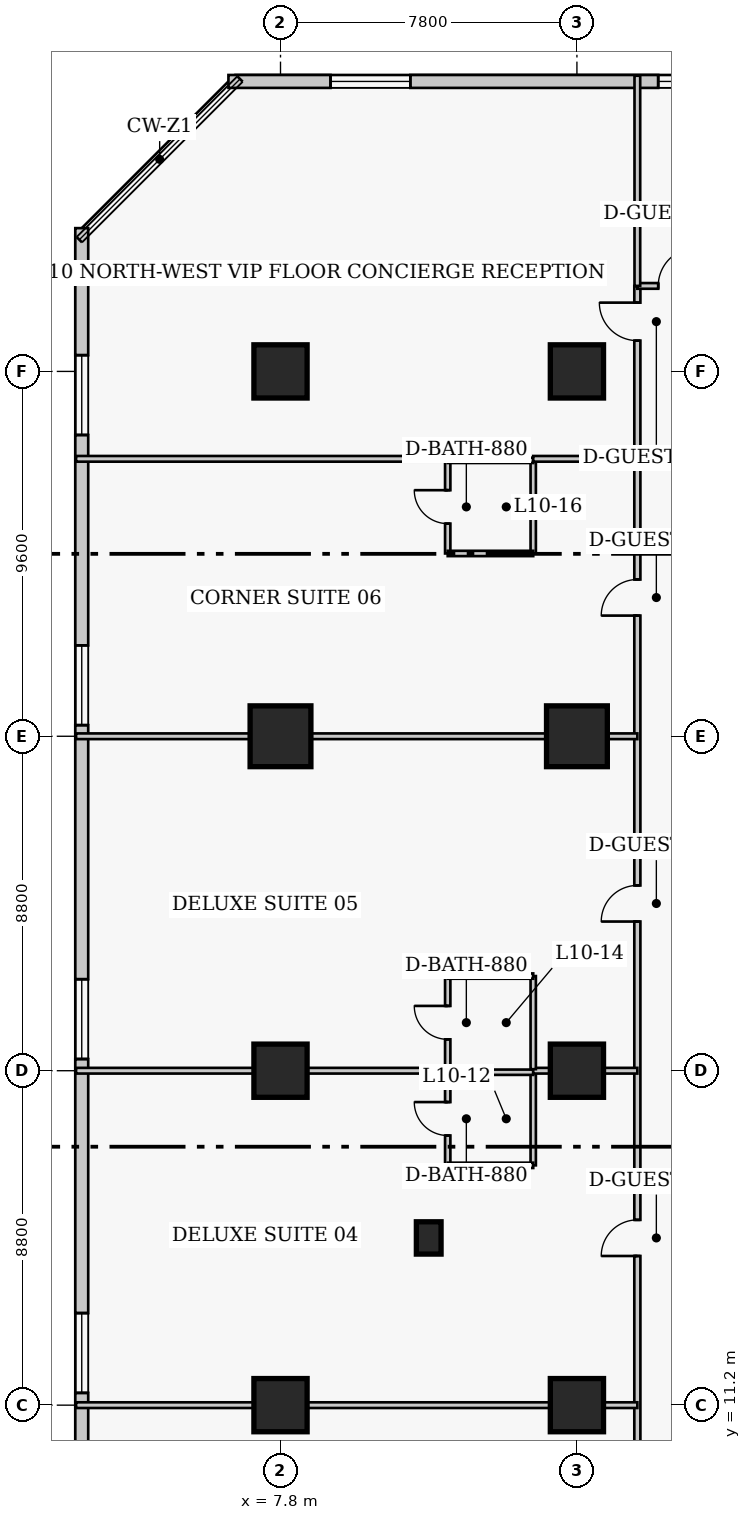
"""IFC4 building model, lengths in metres.
Left out: names, types, materials, properties, quantities, classifications, styles, units other than length and angle.
Written with IfcOpenShell. Run it as: python <this file> out.ifc"""

import sys

from ifc_helpers import new_model, si_unit, direction, frame, frame_2d, origin, origin_2d, place, context, subcontext, project, spatial, rectangle, extrude, element, fill, save


model = new_model("IFC4")
c1 = context("Model", 3, precision=1e-05, world=origin(), true_north=direction((0.0, 1.0)))
c2 = subcontext(c1, "Body", "Model", "MODEL_VIEW")
j1 = project(units=[si_unit("LENGTHUNIT", "METRE"), si_unit("PLANEANGLEUNIT", "RADIAN")], contexts=[c1])
p1 = place(None, origin())
s1 = spatial("IfcSite", under=j1, at=p1, CompositionType="ELEMENT")
p2 = place(p1, origin())
s2 = spatial("IfcBuilding", under=s1, at=p2, CompositionType="ELEMENT")
p3 = place(p2, frame((0.0, 0.0, 45.0)))
s3 = spatial("IfcBuildingStorey", under=s2, at=p3, CompositionType="ELEMENT", Elevation=45.0)
for number, where, z_axis, x_axis in (
    (1, (7.8, 11.2, 0.0), (0.0, 0.0, 1.0), (1.0, 0.0, 0.0)),
    (2, (7.8, 20.0, 0.0), (0.0, 0.0, 1.0), (1.0, 0.0, 0.0)),
):
    element("IfcColumn", number, at=place(p3, frame(where, z_axis=z_axis, x_axis=x_axis)), inside=s3, PredefinedType="COLUMN", context=c2, shape_type="SweptSolid", body=[
        extrude(rectangle(XDim=1.4, YDim=1.4, at=origin_2d()), origin(), (0.0, 0.0, 1.0), 3.8),
    ])
p4 = place(p3, frame((7.8, 28.8, 0.0), z_axis=(0.0, 0.0, 1.0), x_axis=(1.0, 0.0, 0.0)))
e3 = element("IfcColumn", 3, at=p4, inside=s3, PredefinedType="COLUMN", context=c2, shape_type="SweptSolid", body=[
    extrude(rectangle(XDim=1.6, YDim=1.6, at=origin_2d()), origin(), (0.0, 0.0, 1.0), 3.8),
])
for number, where, z_axis, x_axis in (
    (4, (7.8, 38.4, 0.0), (0.0, 0.0, 1.0), (1.0, 0.0, 0.0)),
    (5, (15.6, 11.2, 0.0), (0.0, 0.0, 1.0), (1.0, 0.0, 0.0)),
    (6, (15.6, 20.0, 0.0), (0.0, 0.0, 1.0), (1.0, 0.0, 0.0)),
):
    element("IfcColumn", number, at=place(p3, frame(where, z_axis=z_axis, x_axis=x_axis)), inside=s3, PredefinedType="COLUMN", context=c2, shape_type="SweptSolid", body=[
        extrude(rectangle(XDim=1.4, YDim=1.4, at=origin_2d()), origin(), (0.0, 0.0, 1.0), 3.8),
    ])
p5 = place(p3, frame((15.6, 28.8, 0.0), z_axis=(0.0, 0.0, 1.0), x_axis=(1.0, 0.0, 0.0)))
e7 = element("IfcColumn", 7, at=p5, inside=s3, PredefinedType="COLUMN", context=c2, shape_type="SweptSolid", body=[
    extrude(rectangle(XDim=1.6, YDim=1.6, at=origin_2d()), origin(), (0.0, 0.0, 1.0), 3.8),
])
p6 = place(p3, frame((15.6, 38.4, 0.0), z_axis=(0.0, 0.0, 1.0), x_axis=(1.0, 0.0, 0.0)))
e8 = element("IfcColumn", 8, at=p6, inside=s3, PredefinedType="COLUMN", context=c2, shape_type="SweptSolid", body=[
    extrude(rectangle(XDim=1.4, YDim=1.4, at=origin_2d()), origin(), (0.0, 0.0, 1.0), 3.8),
])
p7 = place(p3, frame((11.7, 15.6, 0.0), z_axis=(0.0, 0.0, 1.0), x_axis=(1.0, 0.0, 0.0)))
e9 = element("IfcColumn", 9, at=p7, inside=s3, PredefinedType="PILASTER", context=c2, shape_type="SweptSolid", body=[
    extrude(rectangle(XDim=0.65, YDim=0.85, at=origin_2d()), origin(), (0.0, 0.0, 1.0), 3.8),
])
p8 = place(p3, frame((36.32, 46.03, 0.0), z_axis=(0.0, 0.0, 1.0), x_axis=(-1.0, 0.0, 0.0)))
e10 = element("IfcWall", 10, at=p8, inside=s3, PredefinedType="SOLIDWALL", context=c2, shape_type="SweptSolid", body=[
    extrude(rectangle(XDim=29.89, YDim=0.34, at=frame_2d((14.945, 0.0))), origin(), (0.0, 0.0, 1.0), 3.54),
])
p9 = place(p8, frame((2.686, 0.0, 0.85)))
e11 = element("IfcOpeningElement", 11, at=p9, cuts=e10, PredefinedType="OPENING", context=c2, shape_type="SweptSolid", body=[
    extrude(rectangle(XDim=2.1, YDim=1.85, at=frame_2d((1.05, 0.925))), frame((0.0, 0.18, 0.0), z_axis=(0.0, -1.0, 0.0), x_axis=(1.0, 0.0, 0.0)), (0.0, 0.0, 1.0), 0.36),
])
p10 = place(p8, frame((10.159, 0.0, 0.85)))
e12 = element("IfcOpeningElement", 12, at=p10, cuts=e10, PredefinedType="OPENING", context=c2, shape_type="SweptSolid", body=[
    extrude(rectangle(XDim=2.1, YDim=1.85, at=frame_2d((1.05, 0.925))), frame((0.0, 0.18, 0.0), z_axis=(0.0, -1.0, 0.0), x_axis=(1.0, 0.0, 0.0)), (0.0, 0.0, 1.0), 0.36),
])
p11 = place(p8, frame((16.481, 0.0, 0.85)))
e13 = element("IfcOpeningElement", 13, at=p11, cuts=e10, PredefinedType="OPENING", context=c2, shape_type="SweptSolid", body=[
    extrude(rectangle(XDim=2.1, YDim=1.85, at=frame_2d((1.05, 0.925))), frame((0.0, 0.18, 0.0), z_axis=(0.0, -1.0, 0.0), x_axis=(1.0, 0.0, 0.0)), (0.0, 0.0, 1.0), 0.36),
])
p12 = place(p8, frame((25.104, 0.0, 0.85)))
e14 = element("IfcOpeningElement", 14, at=p12, cuts=e10, PredefinedType="OPENING", context=c2, shape_type="SweptSolid", body=[
    extrude(rectangle(XDim=2.1, YDim=1.85, at=frame_2d((1.05, 0.925))), frame((0.0, 0.18, 0.0), z_axis=(0.0, -1.0, 0.0), x_axis=(1.0, 0.0, 0.0)), (0.0, 0.0, 1.0), 0.36),
])
p13 = place(p3, frame((2.57, 42.17, 0.0), z_axis=(0.0, 0.0, 1.0), x_axis=(0.0, -1.0, 0.0)))
e15 = element("IfcWall", 15, at=p13, inside=s3, PredefinedType="SOLIDWALL", context=c2, shape_type="SweptSolid", body=[
    extrude(rectangle(XDim=35.14, YDim=0.34, at=frame_2d((17.57, 0.0))), origin(), (0.0, 0.0, 1.0), 3.54),
])
p14 = place(p13, frame((3.343, 0.0, 0.85)))
e16 = element("IfcOpeningElement", 16, at=p14, cuts=e15, PredefinedType="OPENING", context=c2, shape_type="SweptSolid", body=[
    extrude(rectangle(XDim=2.1, YDim=1.85, at=frame_2d((1.05, 0.925))), frame((0.0, 0.18, 0.0), z_axis=(0.0, -1.0, 0.0), x_axis=(1.0, 0.0, 0.0)), (0.0, 0.0, 1.0), 0.36),
])
p15 = place(p13, frame((10.978, 0.0, 0.85)))
e17 = element("IfcOpeningElement", 17, at=p15, cuts=e15, PredefinedType="OPENING", context=c2, shape_type="SweptSolid", body=[
    extrude(rectangle(XDim=2.1, YDim=1.85, at=frame_2d((1.05, 0.925))), frame((0.0, 0.18, 0.0), z_axis=(0.0, -1.0, 0.0), x_axis=(1.0, 0.0, 0.0)), (0.0, 0.0, 1.0), 0.36),
])
p16 = place(p13, frame((19.762, 0.0, 0.85)))
e18 = element("IfcOpeningElement", 18, at=p16, cuts=e15, PredefinedType="OPENING", context=c2, shape_type="SweptSolid", body=[
    extrude(rectangle(XDim=2.1, YDim=1.85, at=frame_2d((1.05, 0.925))), frame((0.0, 0.18, 0.0), z_axis=(0.0, -1.0, 0.0), x_axis=(1.0, 0.0, 0.0)), (0.0, 0.0, 1.0), 0.36),
])
p17 = place(p13, frame((28.548, 0.0, 0.85)))
e19 = element("IfcOpeningElement", 19, at=p17, cuts=e15, PredefinedType="OPENING", context=c2, shape_type="SweptSolid", body=[
    extrude(rectangle(XDim=2.1, YDim=1.85, at=frame_2d((1.05, 0.925))), frame((0.0, 0.18, 0.0), z_axis=(0.0, -1.0, 0.0), x_axis=(1.0, 0.0, 0.0)), (0.0, 0.0, 1.0), 0.36),
])
p18 = place(p3, frame((17.19, 5.05, 0.0), z_axis=(0.0, 0.0, 1.0), x_axis=(0.0, 1.0, 0.0)))
e20 = element("IfcWall", 20, at=p18, inside=s3, PredefinedType="PARTITIONING", context=c2, shape_type="SweptSolid", body=[
    extrude(rectangle(XDim=35.6, YDim=0.16, at=frame_2d((17.8, 0.0))), origin(), (0.0, 0.0, 1.0), 3.54),
])
p19 = place(p18, frame((2.6, 0.0, 0.0)))
e21 = element("IfcOpeningElement", 21, at=p19, cuts=e20, PredefinedType="OPENING", context=c2, shape_type="SweptSolid", body=[
    extrude(rectangle(XDim=0.95, YDim=2.1, at=frame_2d((0.475, 1.05))), frame((0.0, 0.09, 0.0), z_axis=(0.0, -1.0, 0.0), x_axis=(1.0, 0.0, 0.0)), (0.0, 0.0, 1.0), 0.18),
])
p20 = place(p18, frame((10.075, 0.0, 0.0)))
e22 = element("IfcOpeningElement", 22, at=p20, cuts=e20, PredefinedType="OPENING", context=c2, shape_type="SweptSolid", body=[
    extrude(rectangle(XDim=0.95, YDim=2.1, at=frame_2d((0.475, 1.05))), frame((0.0, 0.09, 0.0), z_axis=(0.0, -1.0, 0.0), x_axis=(1.0, 0.0, 0.0)), (0.0, 0.0, 1.0), 0.18),
])
p21 = place(p18, frame((18.875, 0.0, 0.0)))
e23 = element("IfcOpeningElement", 23, at=p21, cuts=e20, PredefinedType="OPENING", context=c2, shape_type="SweptSolid", body=[
    extrude(rectangle(XDim=0.95, YDim=2.1, at=frame_2d((0.475, 1.05))), frame((0.0, 0.09, 0.0), z_axis=(0.0, -1.0, 0.0), x_axis=(1.0, 0.0, 0.0)), (0.0, 0.0, 1.0), 0.18),
])
p22 = place(p18, frame((26.925, 0.0, 0.0)))
e24 = element("IfcOpeningElement", 24, at=p22, cuts=e20, PredefinedType="OPENING", context=c2, shape_type="SweptSolid", body=[
    extrude(rectangle(XDim=0.95, YDim=2.1, at=frame_2d((0.475, 1.05))), frame((0.0, 0.09, 0.0), z_axis=(0.0, -1.0, 0.0), x_axis=(1.0, 0.0, 0.0)), (0.0, 0.0, 1.0), 0.18),
])
p23 = place(p18, frame((34.16, 0.0, 0.0)))
e25 = element("IfcOpeningElement", 25, at=p23, cuts=e20, PredefinedType="OPENING", context=c2, shape_type="SweptSolid", body=[
    extrude(rectangle(XDim=1.0, YDim=2.15, at=frame_2d((0.5, 1.075))), frame((0.0, 0.09, 0.0), z_axis=(0.0, -1.0, 0.0), x_axis=(1.0, 0.0, 0.0)), (0.0, 0.0, 1.0), 0.18),
])
p24 = place(p3, frame((17.19, 40.65, 0.0), z_axis=(0.0, 0.0, 1.0), x_axis=(1.0, 0.0, 0.0)))
e26 = element("IfcWall", 26, at=p24, inside=s3, PredefinedType="PARTITIONING", context=c2, shape_type="SweptSolid", body=[
    extrude(rectangle(XDim=4.91, YDim=0.15, at=frame_2d((2.455, 0.0))), origin(), (0.0, 0.0, 1.0), 3.54),
])
p25 = place(p24, frame((0.55, 0.0, 0.0)))
e27 = element("IfcOpeningElement", 27, at=p25, cuts=e26, PredefinedType="OPENING", context=c2, shape_type="SweptSolid", body=[
    extrude(rectangle(XDim=1.0, YDim=2.15, at=frame_2d((0.5, 1.075))), frame((0.0, 0.085, 0.0), z_axis=(0.0, -1.0, 0.0), x_axis=(1.0, 0.0, 0.0)), (0.0, 0.0, 1.0), 0.17),
])
p26 = place(p3, frame((17.19, 40.65, 0.0), z_axis=(0.0, 0.0, 1.0), x_axis=(0.0, 1.0, 0.0)))
e28 = element("IfcWall", 28, at=p26, inside=s3, PredefinedType="PARTITIONING", context=c2, shape_type="SweptSolid", body=[
    extrude(rectangle(XDim=5.53, YDim=0.15, at=frame_2d((2.765, 0.0))), origin(), (0.0, 0.0, 1.0), 3.54),
])
p27 = place(p3, frame((2.42, 11.2, 0.0), z_axis=(0.0, 0.0, 1.0), x_axis=(1.0, 0.0, 0.0)))
e29 = element("IfcWall", 29, at=p27, inside=s3, PredefinedType="PARTITIONING", context=c2, shape_type="SweptSolid", body=[
    extrude(rectangle(XDim=14.77, YDim=0.15, at=frame_2d((7.385, 0.0))), origin(), (0.0, 0.0, 1.0), 2.593),
])
p28 = place(p3, frame((12.2, 17.51, 0.0), z_axis=(0.0, 0.0, 1.0), x_axis=(0.0, 1.0, 0.0)))
e30 = element("IfcWall", 30, at=p28, inside=s3, PredefinedType="PLUMBINGWALL", context=c2, shape_type="SweptSolid", body=[
    extrude(rectangle(XDim=2.45, YDim=0.14, at=frame_2d((1.225, 0.0))), origin(), (0.0, 0.0, 1.0), 3.54),
])
p29 = place(p28, frame((0.785, 0.0, 0.0)))
e31 = element("IfcOpeningElement", 31, at=p29, cuts=e30, PredefinedType="OPENING", context=c2, shape_type="SweptSolid", body=[
    extrude(rectangle(XDim=0.88, YDim=2.05, at=frame_2d((0.44, 1.025))), frame((0.0, 0.08, 0.0), z_axis=(0.0, -1.0, 0.0), x_axis=(1.0, 0.0, 0.0)), (0.0, 0.0, 1.0), 0.16),
])
p30 = place(p3, frame((14.45, 17.51, 0.0), z_axis=(0.0, 0.0, 1.0), x_axis=(0.0, 1.0, 0.0)))
e32 = element("IfcWall", 32, at=p30, inside=s3, PredefinedType="PLUMBINGWALL", context=c2, shape_type="SweptSolid", body=[
    extrude(rectangle(XDim=2.45, YDim=0.14, at=frame_2d((1.225, 0.0))), origin(), (0.0, 0.0, 1.0), 3.54),
])
p31 = place(p3, frame((12.2, 17.51, 0.0), z_axis=(0.0, 0.0, 1.0), x_axis=(1.0, 0.0, 0.0)))
e33 = element("IfcWall", 33, at=p31, inside=s3, PredefinedType="PLUMBINGWALL", context=c2, shape_type="SweptSolid", body=[
    extrude(rectangle(XDim=2.25, YDim=0.14, at=frame_2d((1.125, 0.0))), origin(), (0.0, 0.0, 1.0), 3.54),
])
p32 = place(p3, frame((12.2, 19.96, 0.0), z_axis=(0.0, 0.0, 1.0), x_axis=(1.0, 0.0, 0.0)))
e34 = element("IfcWall", 34, at=p32, inside=s3, PredefinedType="PLUMBINGWALL", context=c2, shape_type="SweptSolid", body=[
    extrude(rectangle(XDim=2.25, YDim=0.14, at=frame_2d((1.125, 0.0))), origin(), (0.0, 0.0, 1.0), 2.593),
])
p33 = place(p3, frame((2.42, 20.0, 0.0), z_axis=(0.0, 0.0, 1.0), x_axis=(1.0, 0.0, 0.0)))
e35 = element("IfcWall", 35, at=p33, inside=s3, PredefinedType="PARTITIONING", context=c2, shape_type="SweptSolid", body=[
    extrude(rectangle(XDim=9.78, YDim=0.15, at=frame_2d((4.89, 0.0))), origin(), (0.0, 0.0, 1.0), 2.593),
])
p34 = place(p3, frame((14.45, 20.0, 0.0), z_axis=(0.0, 0.0, 1.0), x_axis=(1.0, 0.0, 0.0)))
e36 = element("IfcWall", 36, at=p34, inside=s3, PredefinedType="PARTITIONING", context=c2, shape_type="SweptSolid", body=[
    extrude(rectangle(XDim=2.74, YDim=0.15, at=frame_2d((1.37, 0.0))), origin(), (0.0, 0.0, 1.0), 2.593),
])
p35 = place(p3, frame((12.2, 20.04, 0.0), z_axis=(0.0, 0.0, 1.0), x_axis=(0.0, 1.0, 0.0)))
e37 = element("IfcWall", 37, at=p35, inside=s3, PredefinedType="PLUMBINGWALL", context=c2, shape_type="SweptSolid", body=[
    extrude(rectangle(XDim=2.45, YDim=0.14, at=frame_2d((1.225, 0.0))), origin(), (0.0, 0.0, 1.0), 3.54),
])
p36 = place(p35, frame((0.785, 0.0, 0.0)))
e38 = element("IfcOpeningElement", 38, at=p36, cuts=e37, PredefinedType="OPENING", context=c2, shape_type="SweptSolid", body=[
    extrude(rectangle(XDim=0.88, YDim=2.05, at=frame_2d((0.44, 1.025))), frame((0.0, 0.08, 0.0), z_axis=(0.0, -1.0, 0.0), x_axis=(1.0, 0.0, 0.0)), (0.0, 0.0, 1.0), 0.16),
])
p37 = place(p3, frame((14.45, 20.04, 0.0), z_axis=(0.0, 0.0, 1.0), x_axis=(0.0, 1.0, 0.0)))
e39 = element("IfcWall", 39, at=p37, inside=s3, PredefinedType="PLUMBINGWALL", context=c2, shape_type="SweptSolid", body=[
    extrude(rectangle(XDim=2.45, YDim=0.14, at=frame_2d((1.225, 0.0))), origin(), (0.0, 0.0, 1.0), 3.54),
])
p38 = place(p3, frame((12.2, 22.49, 0.0), z_axis=(0.0, 0.0, 1.0), x_axis=(1.0, 0.0, 0.0)))
e40 = element("IfcWall", 40, at=p38, inside=s3, PredefinedType="PLUMBINGWALL", context=c2, shape_type="SweptSolid", body=[
    extrude(rectangle(XDim=2.25, YDim=0.14, at=frame_2d((1.125, 0.0))), origin(), (0.0, 0.0, 1.0), 3.54),
])
p39 = place(p3, frame((2.42, 28.8, 0.0), z_axis=(0.0, 0.0, 1.0), x_axis=(1.0, 0.0, 0.0)))
e41 = element("IfcWall", 41, at=p39, inside=s3, PredefinedType="PARTITIONING", context=c2, shape_type="SweptSolid", body=[
    extrude(rectangle(XDim=14.77, YDim=0.15, at=frame_2d((7.385, 0.0))), origin(), (0.0, 0.0, 1.0), 2.593),
])
p40 = place(p3, frame((12.2, 33.61, 0.0), z_axis=(0.0, 0.0, 1.0), x_axis=(0.0, 1.0, 0.0)))
e42 = element("IfcWall", 42, at=p40, inside=s3, PredefinedType="PLUMBINGWALL", context=c2, shape_type="SweptSolid", body=[
    extrude(rectangle(XDim=2.45, YDim=0.14, at=frame_2d((1.225, 0.0))), origin(), (0.0, 0.0, 1.0), 3.54),
])
p41 = place(p40, frame((0.785, 0.0, 0.0)))
e43 = element("IfcOpeningElement", 43, at=p41, cuts=e42, PredefinedType="OPENING", context=c2, shape_type="SweptSolid", body=[
    extrude(rectangle(XDim=0.88, YDim=2.05, at=frame_2d((0.44, 1.025))), frame((0.0, 0.08, 0.0), z_axis=(0.0, -1.0, 0.0), x_axis=(1.0, 0.0, 0.0)), (0.0, 0.0, 1.0), 0.16),
])
p42 = place(p3, frame((14.45, 33.61, 0.0), z_axis=(0.0, 0.0, 1.0), x_axis=(0.0, 1.0, 0.0)))
e44 = element("IfcWall", 44, at=p42, inside=s3, PredefinedType="PLUMBINGWALL", context=c2, shape_type="SweptSolid", body=[
    extrude(rectangle(XDim=2.45, YDim=0.14, at=frame_2d((1.225, 0.0))), origin(), (0.0, 0.0, 1.0), 3.54),
])
for number, where, z_axis, x_axis in (
    (45, (12.2, 33.61, 0.0), (0.0, 0.0, 1.0), (1.0, 0.0, 0.0)),
    (46, (12.2, 36.06, 0.0), (0.0, 0.0, 1.0), (1.0, 0.0, 0.0)),
):
    element("IfcWall", number, at=place(p3, frame(where, z_axis=z_axis, x_axis=x_axis)), inside=s3, PredefinedType="PLUMBINGWALL", context=c2, shape_type="SweptSolid", body=[
        extrude(rectangle(XDim=2.25, YDim=0.14, at=frame_2d((1.125, 0.0))), origin(), (0.0, 0.0, 1.0), 3.54),
    ])
p43 = place(p3, frame((2.42, 36.1, 0.0), z_axis=(0.0, 0.0, 1.0), x_axis=(1.0, 0.0, 0.0)))
e47 = element("IfcWall", 47, at=p43, inside=s3, PredefinedType="PARTITIONING", context=c2, shape_type="SweptSolid", body=[
    extrude(rectangle(XDim=9.78, YDim=0.15, at=frame_2d((4.89, 0.0))), origin(), (0.0, 0.0, 1.0), 3.54),
])
p44 = place(p3, frame((14.45, 36.1, 0.0), z_axis=(0.0, 0.0, 1.0), x_axis=(1.0, 0.0, 0.0)))
e48 = element("IfcWall", 48, at=p44, inside=s3, PredefinedType="PARTITIONING", context=c2, shape_type="SweptSolid", body=[
    extrude(rectangle(XDim=2.74, YDim=0.15, at=frame_2d((1.37, 0.0))), origin(), (0.0, 0.0, 1.0), 3.54),
])
p45 = place(p11, origin())
e49 = element("IfcWindow", 49, at=p45, inside=s3, PartitioningType="SINGLE_PANEL", PredefinedType="WINDOW", context=c2, shape_type="SweptSolid", body=[
    extrude(rectangle(XDim=2.1, YDim=1.85, at=frame_2d((1.05, 0.925))), frame((0.0, 0.03, 0.0), z_axis=(0.0, -1.0, 0.0), x_axis=(1.0, 0.0, 0.0)), (0.0, 0.0, 1.0), 0.06),
])
fill(e13, e49)
p46 = place(p12, origin())
e50 = element("IfcWindow", 50, at=p46, inside=s3, PartitioningType="SINGLE_PANEL", PredefinedType="WINDOW", context=c2, shape_type="SweptSolid", body=[
    extrude(rectangle(XDim=2.1, YDim=1.85, at=frame_2d((1.05, 0.925))), frame((0.0, 0.03, 0.0), z_axis=(0.0, -1.0, 0.0), x_axis=(1.0, 0.0, 0.0)), (0.0, 0.0, 1.0), 0.06),
])
fill(e14, e50)
p47 = place(p14, origin())
e51 = element("IfcWindow", 51, at=p47, inside=s3, PartitioningType="SINGLE_PANEL", PredefinedType="WINDOW", context=c2, shape_type="SweptSolid", body=[
    extrude(rectangle(XDim=2.1, YDim=1.85, at=frame_2d((1.05, 0.925))), frame((0.0, 0.03, 0.0), z_axis=(0.0, -1.0, 0.0), x_axis=(1.0, 0.0, 0.0)), (0.0, 0.0, 1.0), 0.06),
])
fill(e16, e51)
p48 = place(p15, origin())
e52 = element("IfcWindow", 52, at=p48, inside=s3, PartitioningType="SINGLE_PANEL", PredefinedType="WINDOW", context=c2, shape_type="SweptSolid", body=[
    extrude(rectangle(XDim=2.1, YDim=1.85, at=frame_2d((1.05, 0.925))), frame((0.0, 0.03, 0.0), z_axis=(0.0, -1.0, 0.0), x_axis=(1.0, 0.0, 0.0)), (0.0, 0.0, 1.0), 0.06),
])
fill(e17, e52)
p49 = place(p16, origin())
e53 = element("IfcWindow", 53, at=p49, inside=s3, PartitioningType="SINGLE_PANEL", PredefinedType="WINDOW", context=c2, shape_type="SweptSolid", body=[
    extrude(rectangle(XDim=2.1, YDim=1.85, at=frame_2d((1.05, 0.925))), frame((0.0, 0.03, 0.0), z_axis=(0.0, -1.0, 0.0), x_axis=(1.0, 0.0, 0.0)), (0.0, 0.0, 1.0), 0.06),
])
fill(e18, e53)
p50 = place(p17, origin())
e54 = element("IfcWindow", 54, at=p50, inside=s3, PartitioningType="SINGLE_PANEL", PredefinedType="WINDOW", context=c2, shape_type="SweptSolid", body=[
    extrude(rectangle(XDim=2.1, YDim=1.85, at=frame_2d((1.05, 0.925))), frame((0.0, 0.03, 0.0), z_axis=(0.0, -1.0, 0.0), x_axis=(1.0, 0.0, 0.0)), (0.0, 0.0, 1.0), 0.06),
])
fill(e19, e54)
p51 = place(p25, origin())
e55 = element("IfcDoor", 55, at=p51, inside=s3, OperationType="SINGLE_SWING_RIGHT", PredefinedType="DOOR", context=c2, shape_type="SweptSolid", body=[
    extrude(rectangle(XDim=1.0, YDim=2.15, at=frame_2d((0.5, 1.075))), frame((0.0, 0.025, 0.0), z_axis=(0.0, -1.0, 0.0), x_axis=(1.0, 0.0, 0.0)), (0.0, 0.0, 1.0), 0.05),
])
fill(e27, e55)
p52 = place(p29, origin())
e56 = element("IfcDoor", 56, at=p52, inside=s3, OperationType="SINGLE_SWING_RIGHT", PredefinedType="DOOR", context=c2, shape_type="SweptSolid", body=[
    extrude(rectangle(XDim=0.88, YDim=2.05, at=frame_2d((0.44, 1.025))), frame((0.0, 0.025, 0.0), z_axis=(0.0, -1.0, 0.0), x_axis=(1.0, 0.0, 0.0)), (0.0, 0.0, 1.0), 0.05),
])
fill(e31, e56)
p53 = place(p20, origin())
e57 = element("IfcDoor", 57, at=p53, inside=s3, OperationType="SINGLE_SWING_LEFT", PredefinedType="DOOR", context=c2, shape_type="SweptSolid", body=[
    extrude(rectangle(XDim=0.95, YDim=2.1, at=frame_2d((0.475, 1.05))), frame((0.0, 0.025, 0.0), z_axis=(0.0, -1.0, 0.0), x_axis=(1.0, 0.0, 0.0)), (0.0, 0.0, 1.0), 0.05),
])
fill(e22, e57)
p54 = place(p36, origin())
e58 = element("IfcDoor", 58, at=p54, inside=s3, OperationType="SINGLE_SWING_RIGHT", PredefinedType="DOOR", context=c2, shape_type="SweptSolid", body=[
    extrude(rectangle(XDim=0.88, YDim=2.05, at=frame_2d((0.44, 1.025))), frame((0.0, 0.025, 0.0), z_axis=(0.0, -1.0, 0.0), x_axis=(1.0, 0.0, 0.0)), (0.0, 0.0, 1.0), 0.05),
])
fill(e38, e58)
p55 = place(p21, origin())
e59 = element("IfcDoor", 59, at=p55, inside=s3, OperationType="SINGLE_SWING_LEFT", PredefinedType="DOOR", context=c2, shape_type="SweptSolid", body=[
    extrude(rectangle(XDim=0.95, YDim=2.1, at=frame_2d((0.475, 1.05))), frame((0.0, 0.025, 0.0), z_axis=(0.0, -1.0, 0.0), x_axis=(1.0, 0.0, 0.0)), (0.0, 0.0, 1.0), 0.05),
])
fill(e23, e59)
p56 = place(p41, origin())
e60 = element("IfcDoor", 60, at=p56, inside=s3, OperationType="SINGLE_SWING_RIGHT", PredefinedType="DOOR", context=c2, shape_type="SweptSolid", body=[
    extrude(rectangle(XDim=0.88, YDim=2.05, at=frame_2d((0.44, 1.025))), frame((0.0, 0.025, 0.0), z_axis=(0.0, -1.0, 0.0), x_axis=(1.0, 0.0, 0.0)), (0.0, 0.0, 1.0), 0.05),
])
fill(e43, e60)
p57 = place(p22, origin())
e61 = element("IfcDoor", 61, at=p57, inside=s3, OperationType="SINGLE_SWING_LEFT", PredefinedType="DOOR", context=c2, shape_type="SweptSolid", body=[
    extrude(rectangle(XDim=0.95, YDim=2.1, at=frame_2d((0.475, 1.05))), frame((0.0, 0.025, 0.0), z_axis=(0.0, -1.0, 0.0), x_axis=(1.0, 0.0, 0.0)), (0.0, 0.0, 1.0), 0.05),
])
fill(e24, e61)
p58 = place(p23, origin())
e62 = element("IfcDoor", 62, at=p58, inside=s3, OperationType="SINGLE_SWING_RIGHT", PredefinedType="DOOR", context=c2, shape_type="SweptSolid", body=[
    extrude(rectangle(XDim=1.0, YDim=2.15, at=frame_2d((0.5, 1.075))), frame((0.0, 0.025, 0.0), z_axis=(0.0, -1.0, 0.0), x_axis=(1.0, 0.0, 0.0)), (0.0, 0.0, 1.0), 0.05),
])
fill(e25, e62)
save(model, sys.argv[1])
